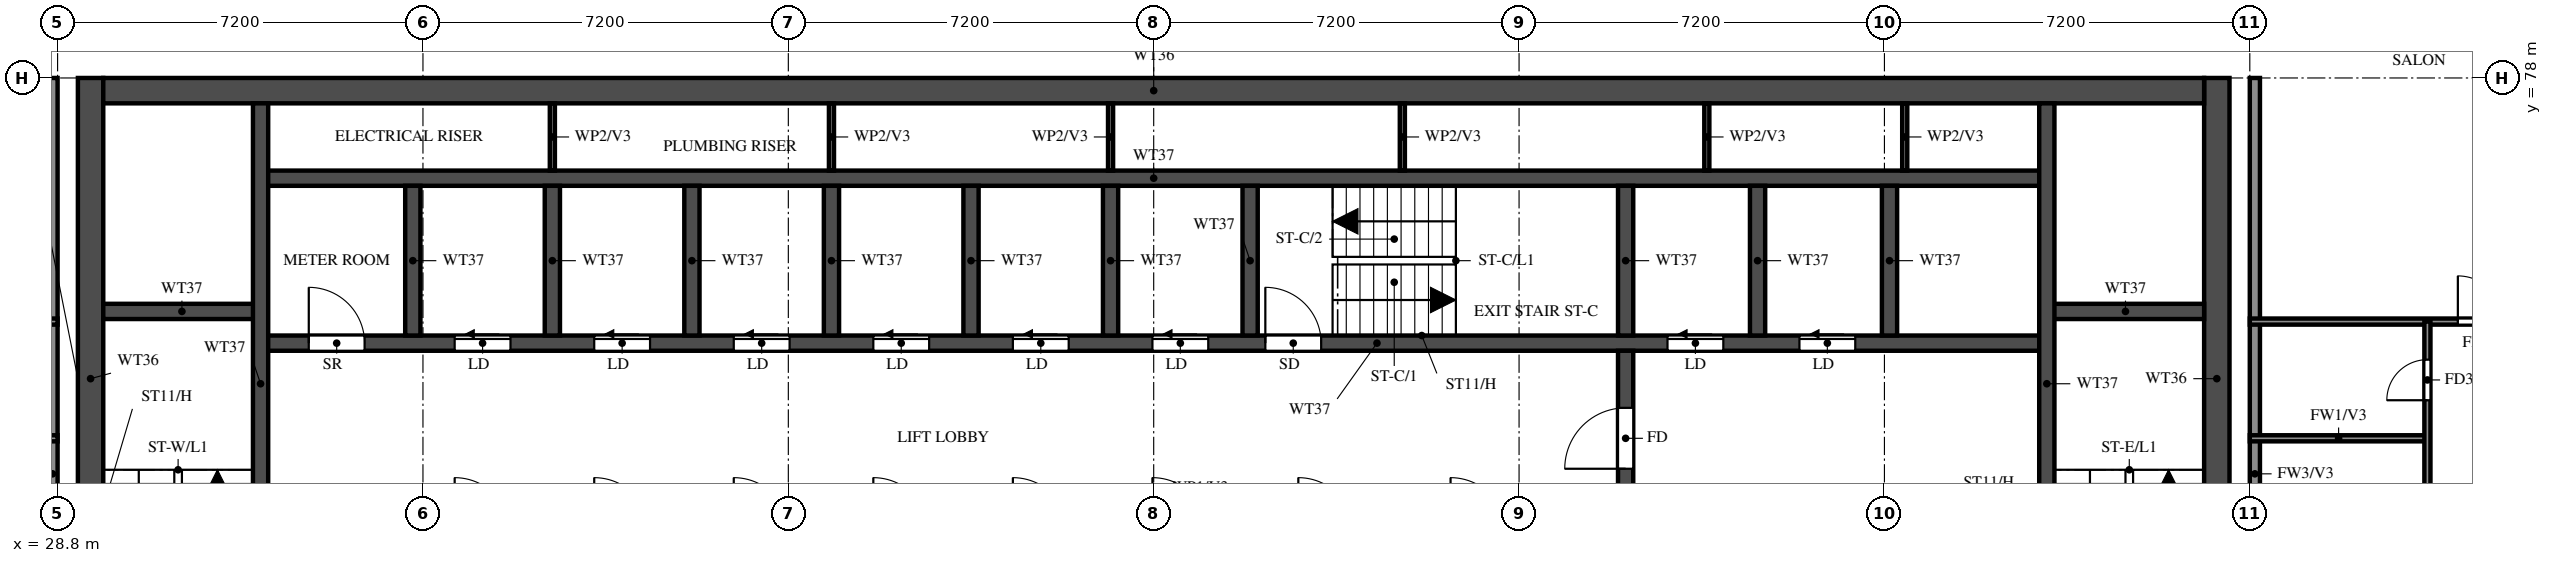
"""IFC4 building model, lengths in metres.
Left out: names, types, materials, properties, quantities, classifications, styles, units other than length and angle.
Written with IfcOpenShell. Run it as: python <this file> out.ifc"""

import sys

from ifc_helpers import new_model, si_unit, direction, frame, frame_2d, origin, place, context, subcontext, project, spatial, rectangle, extrude, element, fill, save


model = new_model("IFC4")
c1 = context("Model", 3, precision=1e-05, world=origin(), true_north=direction((0.0, 1.0)))
c2 = subcontext(c1, "Body", "Model", "MODEL_VIEW")
j1 = project(units=[si_unit("LENGTHUNIT", "METRE"), si_unit("PLANEANGLEUNIT", "RADIAN")], contexts=[c1])
p1 = place(None, origin())
s1 = spatial("IfcSite", under=j1, at=p1, CompositionType="ELEMENT")
p2 = place(p1, origin())
s2 = spatial("IfcBuilding", under=s1, at=p2, CompositionType="ELEMENT")
p3 = place(p2, frame((0.0, 0.0, 218.5)))
s3 = spatial("IfcBuildingStorey", under=s2, at=p3, CompositionType="ELEMENT", Elevation=218.5)
for number, where, z_axis, x_axis in (
    (1, (29.45, 66.15, 0.0), (0.0, 0.0, 1.0), (0.0, 1.0, 0.0)),
    (2, (71.35, 66.15, 0.0), (0.0, 0.0, 1.0), (0.0, 1.0, 0.0)),
):
    element("IfcWall", number, at=place(p3, frame(where, z_axis=z_axis, x_axis=x_axis)), inside=s3, PredefinedType="SHEAR", context=c2, shape_type="SweptSolid", body=[
        extrude(rectangle(XDim=11.85, YDim=0.5, at=frame_2d((5.925, 0.0))), origin(), (0.0, 0.0, 1.0), 3.22),
    ])
p4 = place(p3, frame((29.7, 77.75, 0.0), z_axis=(0.0, 0.0, 1.0), x_axis=(1.0, 0.0, 0.0)))
e3 = element("IfcWall", 3, at=p4, inside=s3, PredefinedType="SHEAR", context=c2, shape_type="SweptSolid", body=[
    extrude(rectangle(XDim=41.4, YDim=0.5, at=frame_2d((20.7, 0.0))), origin(), (0.0, 0.0, 1.0), 3.22),
])
p5 = place(p3, frame((32.8, 72.775, 0.0), z_axis=(0.0, 0.0, 1.0), x_axis=(1.0, 0.0, 0.0)))
e4 = element("IfcWall", 4, at=p5, inside=s3, PredefinedType="SHEAR", context=c2, shape_type="SweptSolid", body=[
    extrude(rectangle(XDim=35.2, YDim=0.3, at=frame_2d((17.6, 0.0))), origin(), (0.0, 0.0, 1.0), 3.22),
])
p6 = place(p5, frame((19.8, 0.0, 0.0)))
e5 = element("IfcOpeningElement", 5, at=p6, cuts=e4, PredefinedType="OPENING", context=c2, shape_type="SweptSolid", body=[
    extrude(rectangle(XDim=1.1, YDim=2.1, at=frame_2d((0.55, 1.05))), frame((0.0, 0.16, 0.0), z_axis=(0.0, -1.0, 0.0), x_axis=(1.0, 0.0, 0.0)), (0.0, 0.0, 1.0), 0.32),
])
p7 = place(p5, frame((27.725, 0.0, 0.0)))
e6 = element("IfcOpeningElement", 6, at=p7, cuts=e4, PredefinedType="OPENING", context=c2, shape_type="SweptSolid", body=[
    extrude(rectangle(XDim=1.1, YDim=2.1, at=frame_2d((0.55, 1.05))), frame((0.0, 0.16, 0.0), z_axis=(0.0, -1.0, 0.0), x_axis=(1.0, 0.0, 0.0)), (0.0, 0.0, 1.0), 0.32),
])
p8 = place(p5, frame((30.325, 0.0, 0.0)))
e7 = element("IfcOpeningElement", 7, at=p8, cuts=e4, PredefinedType="OPENING", context=c2, shape_type="SweptSolid", body=[
    extrude(rectangle(XDim=1.1, YDim=2.1, at=frame_2d((0.55, 1.05))), frame((0.0, 0.16, 0.0), z_axis=(0.0, -1.0, 0.0), x_axis=(1.0, 0.0, 0.0)), (0.0, 0.0, 1.0), 0.32),
])
p9 = place(p5, frame((3.825, 0.0, 0.0)))
e8 = element("IfcOpeningElement", 8, at=p9, cuts=e4, PredefinedType="OPENING", context=c2, shape_type="SweptSolid", body=[
    extrude(rectangle(XDim=1.1, YDim=2.1, at=frame_2d((0.55, 1.05))), frame((0.0, 0.16, 0.0), z_axis=(0.0, -1.0, 0.0), x_axis=(1.0, 0.0, 0.0)), (0.0, 0.0, 1.0), 0.32),
])
p10 = place(p5, frame((6.575, 0.0, 0.0)))
e9 = element("IfcOpeningElement", 9, at=p10, cuts=e4, PredefinedType="OPENING", context=c2, shape_type="SweptSolid", body=[
    extrude(rectangle(XDim=1.1, YDim=2.1, at=frame_2d((0.55, 1.05))), frame((0.0, 0.16, 0.0), z_axis=(0.0, -1.0, 0.0), x_axis=(1.0, 0.0, 0.0)), (0.0, 0.0, 1.0), 0.32),
])
p11 = place(p5, frame((9.325, 0.0, 0.0)))
e10 = element("IfcOpeningElement", 10, at=p11, cuts=e4, PredefinedType="OPENING", context=c2, shape_type="SweptSolid", body=[
    extrude(rectangle(XDim=1.1, YDim=2.1, at=frame_2d((0.55, 1.05))), frame((0.0, 0.16, 0.0), z_axis=(0.0, -1.0, 0.0), x_axis=(1.0, 0.0, 0.0)), (0.0, 0.0, 1.0), 0.32),
])
p12 = place(p5, frame((12.075, 0.0, 0.0)))
e11 = element("IfcOpeningElement", 11, at=p12, cuts=e4, PredefinedType="OPENING", context=c2, shape_type="SweptSolid", body=[
    extrude(rectangle(XDim=1.1, YDim=2.1, at=frame_2d((0.55, 1.05))), frame((0.0, 0.16, 0.0), z_axis=(0.0, -1.0, 0.0), x_axis=(1.0, 0.0, 0.0)), (0.0, 0.0, 1.0), 0.32),
])
p13 = place(p5, frame((14.825, 0.0, 0.0)))
e12 = element("IfcOpeningElement", 12, at=p13, cuts=e4, PredefinedType="OPENING", context=c2, shape_type="SweptSolid", body=[
    extrude(rectangle(XDim=1.1, YDim=2.1, at=frame_2d((0.55, 1.05))), frame((0.0, 0.16, 0.0), z_axis=(0.0, -1.0, 0.0), x_axis=(1.0, 0.0, 0.0)), (0.0, 0.0, 1.0), 0.32),
])
p14 = place(p5, frame((17.575, 0.0, 0.0)))
e13 = element("IfcOpeningElement", 13, at=p14, cuts=e4, PredefinedType="OPENING", context=c2, shape_type="SweptSolid", body=[
    extrude(rectangle(XDim=1.1, YDim=2.1, at=frame_2d((0.55, 1.05))), frame((0.0, 0.16, 0.0), z_axis=(0.0, -1.0, 0.0), x_axis=(1.0, 0.0, 0.0)), (0.0, 0.0, 1.0), 0.32),
])
p15 = place(p5, frame((0.95, 0.0, 0.0)))
e14 = element("IfcOpeningElement", 14, at=p15, cuts=e4, PredefinedType="OPENING", context=c2, shape_type="SweptSolid", body=[
    extrude(rectangle(XDim=1.1, YDim=2.1, at=frame_2d((0.55, 1.05))), frame((0.0, 0.16, 0.0), z_axis=(0.0, -1.0, 0.0), x_axis=(1.0, 0.0, 0.0)), (0.0, 0.0, 1.0), 0.32),
])
p16 = place(p3, frame((32.8, 76.025, 0.0), z_axis=(0.0, 0.0, 1.0), x_axis=(1.0, 0.0, 0.0)))
e15 = element("IfcWall", 15, at=p16, inside=s3, PredefinedType="SHEAR", context=c2, shape_type="SweptSolid", body=[
    extrude(rectangle(XDim=35.2, YDim=0.3, at=frame_2d((17.6, 0.0))), origin(), (0.0, 0.0, 1.0), 3.22),
])
for number, where, z_axis, x_axis in (
    (16, (29.7, 73.4, 0.0), (0.0, 0.0, 1.0), (1.0, 0.0, 0.0)),
    (17, (68.0, 73.4, 0.0), (0.0, 0.0, 1.0), (1.0, 0.0, 0.0)),
):
    element("IfcWall", number, at=place(p3, frame(where, z_axis=z_axis, x_axis=x_axis)), inside=s3, PredefinedType="SHEAR", context=c2, shape_type="SweptSolid", body=[
        extrude(rectangle(XDim=3.1, YDim=0.3, at=frame_2d((1.55, 0.0))), origin(), (0.0, 0.0, 1.0), 3.22),
    ])
p17 = place(p3, frame((32.8, 66.45, 0.0), z_axis=(0.0, 0.0, 1.0), x_axis=(0.0, 1.0, 0.0)))
e18 = element("IfcWall", 18, at=p17, inside=s3, PredefinedType="SHEAR", context=c2, shape_type="SweptSolid", body=[
    extrude(rectangle(XDim=11.05, YDim=0.3, at=frame_2d((5.525, 0.0))), origin(), (0.0, 0.0, 1.0), 3.22),
])
p18 = place(p3, frame((68.0, 66.45, 0.0), z_axis=(0.0, 0.0, 1.0), x_axis=(0.0, 1.0, 0.0)))
e19 = element("IfcWall", 19, at=p18, inside=s3, PredefinedType="SHEAR", context=c2, shape_type="SweptSolid", body=[
    extrude(rectangle(XDim=11.05, YDim=0.3, at=frame_2d((5.525, 0.0))), origin(), (0.0, 0.0, 1.0), 3.22),
])
p19 = place(p18, frame((0.15, 0.0, 0.0)))
e20 = element("IfcOpeningElement", 20, at=p19, cuts=e19, PredefinedType="OPENING", context=c2, shape_type="SweptSolid", body=[
    extrude(rectangle(XDim=1.1, YDim=2.1, at=frame_2d((0.55, 1.05))), frame((0.0, 0.16, 0.0), z_axis=(0.0, -1.0, 0.0), x_axis=(1.0, 0.0, 0.0)), (0.0, 0.0, 1.0), 0.32),
])
p20 = place(p3, frame((59.7, 66.45, 0.0), z_axis=(0.0, 0.0, 1.0), x_axis=(0.0, 1.0, 0.0)))
e21 = element("IfcWall", 21, at=p20, inside=s3, PredefinedType="SHEAR", context=c2, shape_type="SweptSolid", body=[
    extrude(rectangle(XDim=6.175, YDim=0.3, at=frame_2d((3.087, 0.0))), origin(), (0.0, 0.0, 1.0), 3.22),
])
p21 = place(p20, frame((3.85, 0.0, 0.0)))
e22 = element("IfcOpeningElement", 22, at=p21, cuts=e21, PredefinedType="OPENING", context=c2, shape_type="SweptSolid", body=[
    extrude(rectangle(XDim=1.2, YDim=2.1, at=frame_2d((0.6, 1.05))), frame((0.0, 0.16, 0.0), z_axis=(0.0, -1.0, 0.0), x_axis=(1.0, 0.0, 0.0)), (0.0, 0.0, 1.0), 0.32),
])
for number, where, z_axis, x_axis in (
    (23, (59.7, 72.925, 0.0), (0.0, 0.0, 1.0), (0.0, 1.0, 0.0)),
    (24, (35.8, 72.925, 0.0), (0.0, 0.0, 1.0), (0.0, 1.0, 0.0)),
    (25, (38.55, 72.925, 0.0), (0.0, 0.0, 1.0), (0.0, 1.0, 0.0)),
    (26, (41.3, 72.925, 0.0), (0.0, 0.0, 1.0), (0.0, 1.0, 0.0)),
    (27, (44.05, 72.925, 0.0), (0.0, 0.0, 1.0), (0.0, 1.0, 0.0)),
    (28, (46.8, 72.925, 0.0), (0.0, 0.0, 1.0), (0.0, 1.0, 0.0)),
    (29, (49.55, 72.925, 0.0), (0.0, 0.0, 1.0), (0.0, 1.0, 0.0)),
    (30, (52.3, 72.925, 0.0), (0.0, 0.0, 1.0), (0.0, 1.0, 0.0)),
    (31, (62.3, 72.925, 0.0), (0.0, 0.0, 1.0), (0.0, 1.0, 0.0)),
    (32, (64.9, 72.925, 0.0), (0.0, 0.0, 1.0), (0.0, 1.0, 0.0)),
):
    element("IfcWall", number, at=place(p3, frame(where, z_axis=z_axis, x_axis=x_axis)), inside=s3, PredefinedType="SHEAR", context=c2, shape_type="SweptSolid", body=[
        extrude(rectangle(XDim=2.95, YDim=0.3, at=frame_2d((1.475, 0.0))), origin(), (0.0, 0.0, 1.0), 3.22),
    ])
for number, where, z_axis, x_axis in (
    (33, (38.55, 76.175, 0.0), (0.0, 0.0, 1.0), (0.0, 1.0, 0.0)),
    (34, (44.05, 76.175, 0.0), (0.0, 0.0, 1.0), (0.0, 1.0, 0.0)),
    (35, (49.55, 76.175, 0.0), (0.0, 0.0, 1.0), (0.0, 1.0, 0.0)),
    (36, (55.3, 76.175, 0.0), (0.0, 0.0, 1.0), (0.0, 1.0, 0.0)),
    (37, (61.3, 76.175, 0.0), (0.0, 0.0, 1.0), (0.0, 1.0, 0.0)),
    (38, (65.2, 76.175, 0.0), (0.0, 0.0, 1.0), (0.0, 1.0, 0.0)),
):
    element("IfcWall", number, at=place(p3, frame(where, z_axis=z_axis, x_axis=x_axis)), inside=s3, PredefinedType="PARTITIONING", context=c2, shape_type="SweptSolid", body=[
        extrude(rectangle(XDim=1.325, YDim=0.1, at=frame_2d((0.663, 0.0))), origin(), (0.0, 0.0, 1.0), 3.22),
    ])
for number, where, z_axis, x_axis in (
    (39, (28.7, 62.4, 0.0), (0.0, 0.0, 1.0), (0.0, 1.0, 0.0)),
    (40, (72.1, 62.4, 0.0), (0.0, 0.0, 1.0), (0.0, 1.0, 0.0)),
):
    element("IfcWall", number, at=place(p3, frame(where, z_axis=z_axis, x_axis=x_axis)), inside=s3, PredefinedType="SOLIDWALL", context=c2, shape_type="SweptSolid", body=[
        extrude(rectangle(XDim=15.6, YDim=0.2, at=frame_2d((7.8, 0.0))), origin(), (0.0, 0.0, 1.0), 3.22),
    ])
for number, where, z_axis, x_axis in (
    (41, (25.3, 70.9, 0.0), (0.0, 0.0, 1.0), (1.0, 0.0, 0.0)),
    (42, (72.0, 70.9, 0.0), (0.0, 0.0, 1.0), (1.0, 0.0, 0.0)),
):
    element("IfcWall", number, at=place(p3, frame(where, z_axis=z_axis, x_axis=x_axis)), inside=s3, PredefinedType="PARTITIONING", context=c2, shape_type="SweptSolid", body=[
        extrude(rectangle(XDim=3.5, YDim=0.12, at=frame_2d((1.75, 0.0))), origin(), (0.0, 0.0, 1.0), 3.22),
    ])
p22 = place(p3, frame((18.525, 73.2, 0.0), z_axis=(0.0, 0.0, 1.0), x_axis=(1.0, 0.0, 0.0)))
e43 = element("IfcWall", 43, at=p22, inside=s3, PredefinedType="PARTITIONING", context=c2, shape_type="SweptSolid", body=[
    extrude(rectangle(XDim=10.275, YDim=0.12, at=frame_2d((5.138, 0.0))), origin(), (0.0, 0.0, 1.0), 2.32),
])
p23 = place(p22, frame((5.275, 0.0, 0.0)))
e44 = element("IfcOpeningElement", 44, at=p23, cuts=e43, PredefinedType="OPENING", context=c2, shape_type="SweptSolid", body=[
    extrude(rectangle(XDim=0.9, YDim=2.1, at=frame_2d((0.45, 1.05))), frame((0.0, 0.07, 0.0), z_axis=(0.0, -1.0, 0.0), x_axis=(1.0, 0.0, 0.0)), (0.0, 0.0, 1.0), 0.14),
])
p24 = place(p3, frame((72.0, 73.2, 0.0), z_axis=(0.0, 0.0, 1.0), x_axis=(1.0, 0.0, 0.0)))
e45 = element("IfcWall", 45, at=p24, inside=s3, PredefinedType="PARTITIONING", context=c2, shape_type="SweptSolid", body=[
    extrude(rectangle(XDim=10.275, YDim=0.12, at=frame_2d((5.137, 0.0))), origin(), (0.0, 0.0, 1.0), 2.32),
])
p25 = place(p24, frame((4.1, 0.0, 0.0)))
e46 = element("IfcOpeningElement", 46, at=p25, cuts=e45, PredefinedType="OPENING", context=c2, shape_type="SweptSolid", body=[
    extrude(rectangle(XDim=0.9, YDim=2.1, at=frame_2d((0.45, 1.05))), frame((0.0, 0.07, 0.0), z_axis=(0.0, -1.0, 0.0), x_axis=(1.0, 0.0, 0.0)), (0.0, 0.0, 1.0), 0.14),
])
p26 = place(p3, frame((75.5, 61.2, 0.0), z_axis=(0.0, 0.0, 1.0), x_axis=(0.0, 1.0, 0.0)))
e47 = element("IfcWall", 47, at=p26, inside=s3, PredefinedType="PARTITIONING", context=c2, shape_type="SweptSolid", body=[
    extrude(rectangle(XDim=12.0, YDim=0.12, at=frame_2d((6.0, 0.0))), origin(), (0.0, 0.0, 1.0), 3.22),
])
p27 = place(p26, frame((4.2, 0.0, 0.0)))
e48 = element("IfcOpeningElement", 48, at=p27, cuts=e47, PredefinedType="OPENING", context=c2, shape_type="SweptSolid", body=[
    extrude(rectangle(XDim=0.9, YDim=2.1, at=frame_2d((0.45, 1.05))), frame((0.0, 0.07, 0.0), z_axis=(0.0, -1.0, 0.0), x_axis=(1.0, 0.0, 0.0)), (0.0, 0.0, 1.0), 0.14),
])
p28 = place(p26, frame((7.975, 0.0, 0.0)))
e49 = element("IfcOpeningElement", 49, at=p28, cuts=e47, PredefinedType="OPENING", context=c2, shape_type="SweptSolid", body=[
    extrude(rectangle(XDim=0.8, YDim=2.1, at=frame_2d((0.4, 1.05))), frame((0.0, 0.07, 0.0), z_axis=(0.0, -1.0, 0.0), x_axis=(1.0, 0.0, 0.0)), (0.0, 0.0, 1.0), 0.14),
])
p29 = place(p26, frame((10.45, 0.0, 0.0)))
e50 = element("IfcOpeningElement", 50, at=p29, cuts=e47, PredefinedType="OPENING", context=c2, shape_type="SweptSolid", body=[
    extrude(rectangle(XDim=0.8, YDim=2.1, at=frame_2d((0.4, 1.05))), frame((0.0, 0.07, 0.0), z_axis=(0.0, -1.0, 0.0), x_axis=(1.0, 0.0, 0.0)), (0.0, 0.0, 1.0), 0.14),
])
p30 = place(p6, origin())
e51 = element("IfcDoor", 51, at=p30, inside=s3, OperationType="SINGLE_SWING_LEFT", PredefinedType="DOOR", context=c2, shape_type="SweptSolid", body=[
    extrude(rectangle(XDim=1.1, YDim=2.1, at=frame_2d((0.55, 1.05))), frame((0.0, 0.025, 0.0), z_axis=(0.0, -1.0, 0.0), x_axis=(1.0, 0.0, 0.0)), (0.0, 0.0, 1.0), 0.05),
])
fill(e5, e51)
p31 = place(p21, origin())
e52 = element("IfcDoor", 52, at=p31, inside=s3, OperationType="SINGLE_SWING_LEFT", PredefinedType="DOOR", context=c2, shape_type="SweptSolid", body=[
    extrude(rectangle(XDim=1.2, YDim=2.1, at=frame_2d((0.6, 1.05))), frame((0.0, 0.025, 0.0), z_axis=(0.0, -1.0, 0.0), x_axis=(1.0, 0.0, 0.0)), (0.0, 0.0, 1.0), 0.05),
])
fill(e22, e52)
p32 = place(p7, origin())
e53 = element("IfcDoor", 53, at=p32, inside=s3, OperationType="SLIDING_TO_LEFT", PredefinedType="DOOR", context=c2, shape_type="SweptSolid", body=[
    extrude(rectangle(XDim=1.1, YDim=2.1, at=frame_2d((0.55, 1.05))), frame((0.0, 0.025, 0.0), z_axis=(0.0, -1.0, 0.0), x_axis=(1.0, 0.0, 0.0)), (0.0, 0.0, 1.0), 0.05),
])
fill(e6, e53)
p33 = place(p8, origin())
e54 = element("IfcDoor", 54, at=p33, inside=s3, OperationType="SLIDING_TO_LEFT", PredefinedType="DOOR", context=c2, shape_type="SweptSolid", body=[
    extrude(rectangle(XDim=1.1, YDim=2.1, at=frame_2d((0.55, 1.05))), frame((0.0, 0.025, 0.0), z_axis=(0.0, -1.0, 0.0), x_axis=(1.0, 0.0, 0.0)), (0.0, 0.0, 1.0), 0.05),
])
fill(e7, e54)
p34 = place(p9, origin())
e55 = element("IfcDoor", 55, at=p34, inside=s3, OperationType="SLIDING_TO_LEFT", PredefinedType="DOOR", context=c2, shape_type="SweptSolid", body=[
    extrude(rectangle(XDim=1.1, YDim=2.1, at=frame_2d((0.55, 1.05))), frame((0.0, 0.025, 0.0), z_axis=(0.0, -1.0, 0.0), x_axis=(1.0, 0.0, 0.0)), (0.0, 0.0, 1.0), 0.05),
])
fill(e8, e55)
p35 = place(p10, origin())
e56 = element("IfcDoor", 56, at=p35, inside=s3, OperationType="SLIDING_TO_LEFT", PredefinedType="DOOR", context=c2, shape_type="SweptSolid", body=[
    extrude(rectangle(XDim=1.1, YDim=2.1, at=frame_2d((0.55, 1.05))), frame((0.0, 0.025, 0.0), z_axis=(0.0, -1.0, 0.0), x_axis=(1.0, 0.0, 0.0)), (0.0, 0.0, 1.0), 0.05),
])
fill(e9, e56)
p36 = place(p11, origin())
e57 = element("IfcDoor", 57, at=p36, inside=s3, OperationType="SLIDING_TO_LEFT", PredefinedType="DOOR", context=c2, shape_type="SweptSolid", body=[
    extrude(rectangle(XDim=1.1, YDim=2.1, at=frame_2d((0.55, 1.05))), frame((0.0, 0.025, 0.0), z_axis=(0.0, -1.0, 0.0), x_axis=(1.0, 0.0, 0.0)), (0.0, 0.0, 1.0), 0.05),
])
fill(e10, e57)
p37 = place(p12, origin())
e58 = element("IfcDoor", 58, at=p37, inside=s3, OperationType="SLIDING_TO_LEFT", PredefinedType="DOOR", context=c2, shape_type="SweptSolid", body=[
    extrude(rectangle(XDim=1.1, YDim=2.1, at=frame_2d((0.55, 1.05))), frame((0.0, 0.025, 0.0), z_axis=(0.0, -1.0, 0.0), x_axis=(1.0, 0.0, 0.0)), (0.0, 0.0, 1.0), 0.05),
])
fill(e11, e58)
p38 = place(p13, origin())
e59 = element("IfcDoor", 59, at=p38, inside=s3, OperationType="SLIDING_TO_LEFT", PredefinedType="DOOR", context=c2, shape_type="SweptSolid", body=[
    extrude(rectangle(XDim=1.1, YDim=2.1, at=frame_2d((0.55, 1.05))), frame((0.0, 0.025, 0.0), z_axis=(0.0, -1.0, 0.0), x_axis=(1.0, 0.0, 0.0)), (0.0, 0.0, 1.0), 0.05),
])
fill(e12, e59)
p39 = place(p14, origin())
e60 = element("IfcDoor", 60, at=p39, inside=s3, OperationType="SLIDING_TO_LEFT", PredefinedType="DOOR", context=c2, shape_type="SweptSolid", body=[
    extrude(rectangle(XDim=1.1, YDim=2.1, at=frame_2d((0.55, 1.05))), frame((0.0, 0.025, 0.0), z_axis=(0.0, -1.0, 0.0), x_axis=(1.0, 0.0, 0.0)), (0.0, 0.0, 1.0), 0.05),
])
fill(e13, e60)
p40 = place(p15, origin())
e61 = element("IfcDoor", 61, at=p40, inside=s3, OperationType="SINGLE_SWING_LEFT", PredefinedType="DOOR", context=c2, shape_type="SweptSolid", body=[
    extrude(rectangle(XDim=1.1, YDim=2.1, at=frame_2d((0.55, 1.05))), frame((0.0, 0.025, 0.0), z_axis=(0.0, -1.0, 0.0), x_axis=(1.0, 0.0, 0.0)), (0.0, 0.0, 1.0), 0.05),
])
fill(e14, e61)
p41 = place(p25, origin())
e62 = element("IfcDoor", 62, at=p41, inside=s3, OperationType="SINGLE_SWING_LEFT", PredefinedType="DOOR", context=c2, shape_type="SweptSolid", body=[
    extrude(rectangle(XDim=0.9, YDim=2.1, at=frame_2d((0.45, 1.05))), frame((0.0, 0.025, 0.0), z_axis=(0.0, -1.0, 0.0), x_axis=(1.0, 0.0, 0.0)), (0.0, 0.0, 1.0), 0.05),
])
fill(e46, e62)
p42 = place(p29, origin())
e63 = element("IfcDoor", 63, at=p42, inside=s3, OperationType="SINGLE_SWING_RIGHT", PredefinedType="DOOR", context=c2, shape_type="SweptSolid", body=[
    extrude(rectangle(XDim=0.8, YDim=2.1, at=frame_2d((0.4, 1.05))), frame((0.0, 0.025, 0.0), z_axis=(0.0, -1.0, 0.0), x_axis=(1.0, 0.0, 0.0)), (0.0, 0.0, 1.0), 0.05),
])
fill(e50, e63)
save(model, sys.argv[1])
